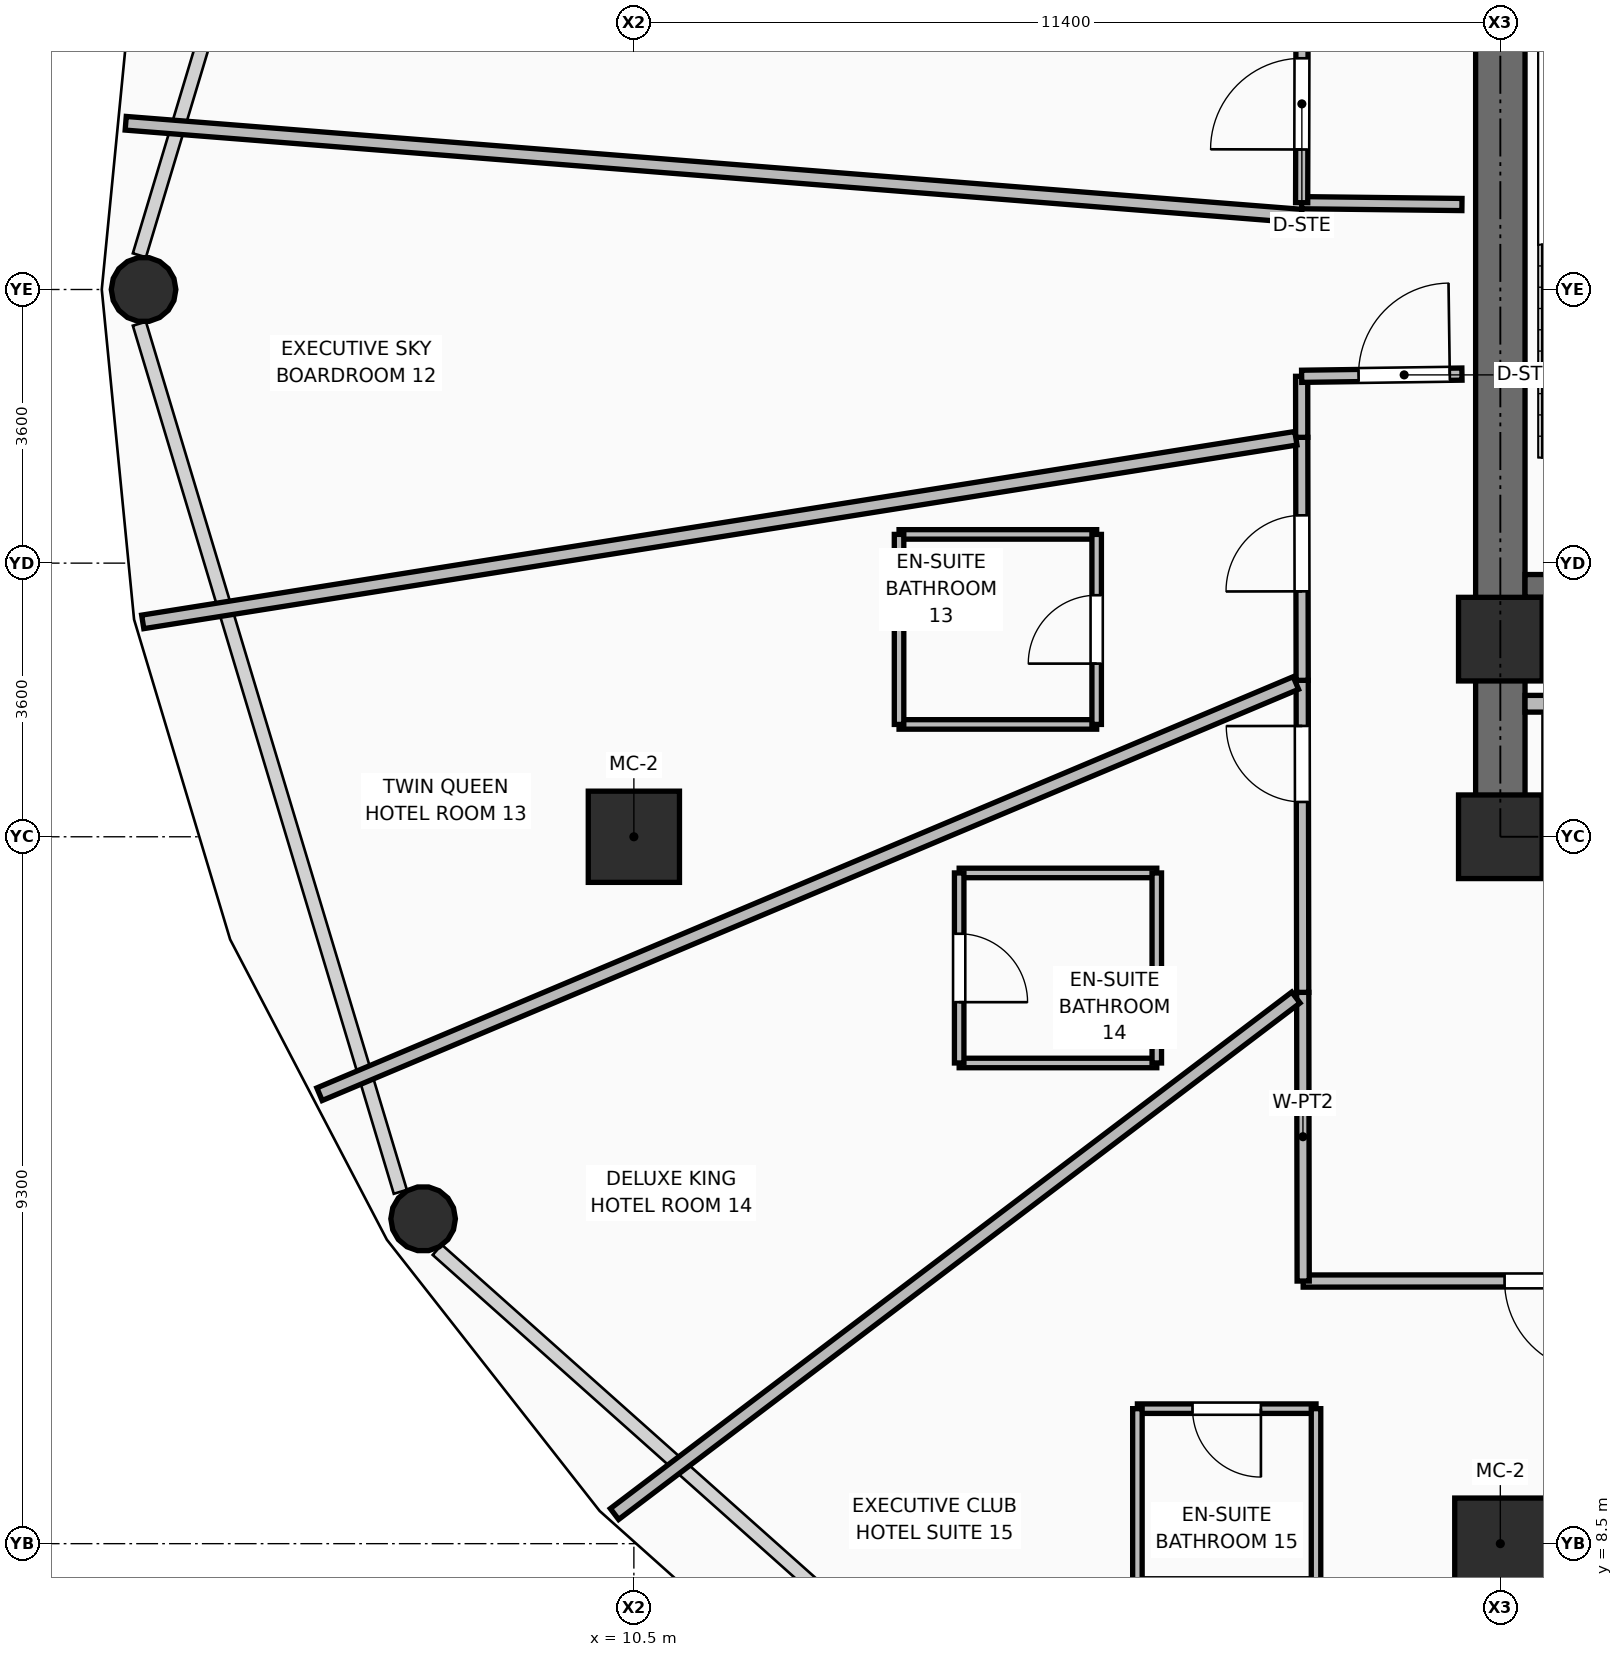
"""IFC4 building model, lengths in metres.
Left out: names, types, materials, properties, quantities, classifications, styles, units other than length and angle.
Written with IfcOpenShell. Run it as: python <this file> out.ifc"""

import sys

from ifc_helpers import new_model, si_unit, direction, frame, frame_2d, origin, origin_2d, place, context, subcontext, project, spatial, rectangle, hollow_rectangle, hollow_circle, extrude, element, fill, save


model = new_model("IFC4")
c1 = context("Model", 3, precision=1e-05, world=origin(), true_north=direction((0.0, 1.0)))
c2 = subcontext(c1, "Body", "Model", "MODEL_VIEW")
j1 = project(units=[si_unit("LENGTHUNIT", "METRE"), si_unit("PLANEANGLEUNIT", "RADIAN")], contexts=[c1])
p1 = place(None, origin())
s1 = spatial("IfcSite", under=j1, at=p1, CompositionType="ELEMENT")
p2 = place(p1, origin())
s2 = spatial("IfcBuilding", under=s1, at=p2, CompositionType="ELEMENT")
p3 = place(p2, frame((0.0, 0.0, 64.5)))
s3 = spatial("IfcBuildingStorey", under=s2, at=p3, CompositionType="ELEMENT", Elevation=64.5)
for number, where, z_axis, x_axis in (
    (1, (21.9, 17.8, 0.0), (0.0, 0.0, 1.0), (1.0, 0.0, 0.0)),
    (2, (21.9, 20.4, 0.0), (0.0, 0.0, 1.0), (1.0, 0.0, 0.0)),
):
    element("IfcColumn", number, at=place(p3, frame(where, z_axis=z_axis, x_axis=x_axis)), inside=s3, PredefinedType="COLUMN", context=c2, shape_type="SweptSolid", body=[
        extrude(rectangle(XDim=1.1, YDim=1.1, at=origin_2d()), origin(), (0.0, 0.0, 1.0), 3.75),
    ])
for number, where, z_axis, x_axis in (
    (3, (21.9, 8.5, 0.0), (0.0, 0.0, 1.0), (1.0, 0.0, 0.0)),
    (4, (10.5, 17.8, 0.0), (0.0, 0.0, 1.0), (1.0, 0.0, 0.0)),
):
    element("IfcColumn", number, at=place(p3, frame(where, z_axis=z_axis, x_axis=x_axis)), inside=s3, PredefinedType="COLUMN", context=c2, shape_type="SweptSolid", body=[
        extrude(hollow_rectangle(XDim=1.2, YDim=1.2, WallThickness=0.045, at=origin_2d()), origin(), (0.0, 0.0, 1.0), 3.75),
    ])
p4 = place(p3, frame((4.049, 25.0, 0.0), z_axis=(-0.055647755416, 0.0, 0.998450463126), x_axis=(0.0, -1.0, 0.0)))
e5 = element("IfcColumn", 5, at=p4, inside=s3, PredefinedType="COLUMN", context=c2, shape_type="SweptSolid", body=[
    extrude(hollow_circle(Radius=0.425, WallThickness=0.04, at=origin_2d()), origin(), (0.0, 0.0, 1.0), 3.576),
])
p5 = place(p3, frame((7.727, 12.774, 0.0), z_axis=(-0.048413411524, -0.024855404506, 0.998518077178), x_axis=(0.456724176891, -0.889608355538, 0.0)))
e6 = element("IfcColumn", 6, at=p5, inside=s3, PredefinedType="COLUMN", context=c2, shape_type="SweptSolid", body=[
    extrude(hollow_circle(Radius=0.425, WallThickness=0.04, at=origin_2d()), origin(), (0.0, 0.0, 1.0), 3.575),
])
p6 = place(p3, frame((21.575, 17.8, 0.0), z_axis=(0.0, 0.0, 1.0), x_axis=(1.0, 0.0, 0.0)))
e7 = element("IfcWall", 7, at=p6, inside=s3, PredefinedType="SHEAR", context=c2, shape_type="SweptSolid", body=[
    extrude(rectangle(XDim=2.175, YDim=0.65, at=frame_2d((1.087, 0.0))), origin(), (0.0, 0.0, 1.0), 3.57),
])
p7 = place(p3, frame((21.9, 18.125, 0.0), z_axis=(0.0, 0.0, 1.0), x_axis=(0.0, 1.0, 0.0)))
e8 = element("IfcWall", 8, at=p7, inside=s3, PredefinedType="SHEAR", context=c2, shape_type="SweptSolid", body=[
    extrude(rectangle(XDim=14.0, YDim=0.65, at=frame_2d((7.0, 0.0))), origin(), (0.0, 0.0, 1.0), 3.57),
])
p8 = place(p3, frame((22.225, 21.1, 0.0), z_axis=(0.0, 0.0, 1.0), x_axis=(1.0, 0.0, 0.0)))
e9 = element("IfcWall", 9, at=p8, inside=s3, PredefinedType="SHEAR", context=c2, shape_type="SweptSolid", body=[
    extrude(rectangle(XDim=3.515, YDim=0.3, at=frame_2d((1.757, 0.0))), origin(), (0.0, 0.0, 1.0), 3.57),
])
p9 = place(p8, frame((1.995, 0.0, 0.0)))
e10 = element("IfcOpeningElement", 10, at=p9, cuts=e9, PredefinedType="OPENING", context=c2, shape_type="SweptSolid", body=[
    extrude(rectangle(XDim=1.05, YDim=2.1, at=frame_2d((0.525, 1.05))), frame((0.0, 0.16, 0.0), z_axis=(0.0, -1.0, 0.0), x_axis=(1.0, 0.0, 0.0)), (0.0, 0.0, 1.0), 0.32),
])
p10 = place(p3, frame((22.225, 19.55, 0.0), z_axis=(0.0, 0.0, 1.0), x_axis=(1.0, 0.0, 0.0)))
e11 = element("IfcWall", 11, at=p10, inside=s3, PredefinedType="PARTITIONING", context=c2, shape_type="SweptSolid", body=[
    extrude(rectangle(XDim=1.565, YDim=0.22, at=frame_2d((0.782, 0.0))), origin(), (0.0, 0.0, 1.0), 2.595),
])
p11 = place(p3, frame((21.395, 26.118, 0.0), z_axis=(0.0, 0.0, 1.0), x_axis=(-0.999934344566, 0.011458907294, 0.0)))
e12 = element("IfcWall", 12, at=p11, inside=s3, PredefinedType="PARTITIONING", context=c2, shape_type="SweptSolid", body=[
    extrude(rectangle(XDim=2.109, YDim=0.16, at=frame_2d((1.055, 0.0))), origin(), (0.0, 0.0, 1.0), 3.55),
])
p12 = place(p3, frame((19.286, 26.142, 0.0), z_axis=(0.0, 0.0, 1.0), x_axis=(0.00212602632, 0.999997740003, 0.0)))
e13 = element("IfcWall", 13, at=p12, inside=s3, PredefinedType="PARTITIONING", context=c2, shape_type="SweptSolid", body=[
    extrude(rectangle(XDim=2.871, YDim=0.16, at=frame_2d((1.436, 0.0))), origin(), (0.0, 0.0, 1.0), 3.55),
])
p13 = place(p12, frame((0.7, 0.0, 0.0)))
e14 = element("IfcOpeningElement", 14, at=p13, cuts=e13, PredefinedType="OPENING", context=c2, shape_type="SweptSolid", body=[
    extrude(rectangle(XDim=1.2, YDim=2.1, at=frame_2d((0.6, 1.05))), frame((0.0, 0.09, 0.0), z_axis=(0.0, -1.0, 0.0), x_axis=(1.0, 0.0, 0.0)), (0.0, 0.0, 1.0), 0.18),
])
p14 = place(p3, frame((26.245, 11.959, 0.0), z_axis=(0.0, 0.0, 1.0), x_axis=(-0.999999841558, -0.000562924303, 0.0)))
e15 = element("IfcWall", 15, at=p14, inside=s3, PredefinedType="PARTITIONING", context=c2, shape_type="SweptSolid", body=[
    extrude(rectangle(XDim=6.939, YDim=0.16, at=frame_2d((3.47, 0.0))), origin(), (0.0, 0.0, 1.0), 2.928),
])
p15 = place(p14, frame((3.089, 0.0, 0.0)))
e16 = element("IfcOpeningElement", 16, at=p15, cuts=e15, PredefinedType="OPENING", context=c2, shape_type="SweptSolid", body=[
    extrude(rectangle(XDim=1.2, YDim=2.1, at=frame_2d((0.6, 1.05))), frame((0.0, 0.09, 0.0), z_axis=(0.0, -1.0, 0.0), x_axis=(1.0, 0.0, 0.0)), (0.0, 0.0, 1.0), 0.18),
])
p16 = place(p3, frame((19.306, 11.955, 0.0), z_axis=(0.0, 0.0, 1.0), x_axis=(-0.001542811226, 0.999998809866, 0.0)))
e17 = element("IfcWall", 17, at=p16, inside=s3, PredefinedType="PARTITIONING", context=c2, shape_type="SweptSolid", body=[
    extrude(rectangle(XDim=3.798, YDim=0.16, at=frame_2d((1.899, 0.0))), origin(), (0.0, 0.0, 1.0), 3.55),
])
p17 = place(p3, frame((19.3, 15.753, 0.0), z_axis=(0.0, 0.0, 1.0), x_axis=(-0.001724750617, 0.999998512617, 0.0)))
e18 = element("IfcWall", 18, at=p17, inside=s3, PredefinedType="PARTITIONING", context=c2, shape_type="SweptSolid", body=[
    extrude(rectangle(XDim=4.105, YDim=0.16, at=frame_2d((2.052, 0.0))), origin(), (0.0, 0.0, 1.0), 2.928),
])
p18 = place(p17, frame((2.505, 0.0, 0.0)))
e19 = element("IfcOpeningElement", 19, at=p18, cuts=e18, PredefinedType="OPENING", context=c2, shape_type="SweptSolid", body=[
    extrude(rectangle(XDim=1.0, YDim=2.1, at=frame_2d((0.5, 1.05))), frame((0.0, 0.09, 0.0), z_axis=(0.0, -1.0, 0.0), x_axis=(1.0, 0.0, 0.0)), (0.0, 0.0, 1.0), 0.18),
])
p19 = place(p3, frame((19.293, 19.858, 0.0), z_axis=(0.0, 0.0, 1.0), x_axis=(-0.001832757518, 0.999998320499, 0.0)))
e20 = element("IfcWall", 20, at=p19, inside=s3, PredefinedType="PARTITIONING", context=c2, shape_type="SweptSolid", body=[
    extrude(rectangle(XDim=3.197, YDim=0.16, at=frame_2d((1.599, 0.0))), origin(), (0.0, 0.0, 1.0), 2.928),
])
p20 = place(p19, frame((1.171, 0.0, 0.0)))
e21 = element("IfcOpeningElement", 21, at=p20, cuts=e20, PredefinedType="OPENING", context=c2, shape_type="SweptSolid", body=[
    extrude(rectangle(XDim=1.0, YDim=2.1, at=frame_2d((0.5, 1.05))), frame((0.0, 0.09, 0.0), z_axis=(0.0, -1.0, 0.0), x_axis=(1.0, 0.0, 0.0)), (0.0, 0.0, 1.0), 0.18),
])
p21 = place(p3, frame((19.287, 23.055, 0.0), z_axis=(0.0, 0.0, 1.0), x_axis=(-0.001520217155, 0.999998844469, 0.0)))
e22 = element("IfcWall", 22, at=p21, inside=s3, PredefinedType="PARTITIONING", context=c2, shape_type="SweptSolid", body=[
    extrude(rectangle(XDim=0.803, YDim=0.16, at=frame_2d((0.401, 0.0))), origin(), (0.0, 0.0, 1.0), 3.55),
])
p22 = place(p3, frame((19.286, 23.858, 0.0), z_axis=(0.0, 0.0, 1.0), x_axis=(0.999905141734, 0.013773435799, 0.0)))
e23 = element("IfcWall", 23, at=p22, inside=s3, PredefinedType="PARTITIONING", context=c2, shape_type="SweptSolid", body=[
    extrude(rectangle(XDim=2.109, YDim=0.16, at=frame_2d((1.055, 0.0))), origin(), (0.0, 0.0, 1.0), 3.55),
])
p23 = place(p22, frame((0.749, 0.0, 0.0)))
e24 = element("IfcOpeningElement", 24, at=p23, cuts=e23, PredefinedType="OPENING", context=c2, shape_type="SweptSolid", body=[
    extrude(rectangle(XDim=1.2, YDim=2.1, at=frame_2d((0.6, 1.05))), frame((0.0, 0.09, 0.0), z_axis=(0.0, -1.0, 0.0), x_axis=(1.0, 0.0, 0.0)), (0.0, 0.0, 1.0), 0.18),
])
p24 = place(p3, frame((19.284, 25.965, 0.0), z_axis=(0.0, 0.0, 1.0), x_axis=(-0.996895062006, 0.078741573192, 0.0)))
e25 = element("IfcWall", 25, at=p24, inside=s3, PredefinedType="PARTITIONING", context=c2, shape_type="SweptSolid", body=[
    extrude(rectangle(XDim=15.518, YDim=0.18, at=frame_2d((7.759, 0.0))), origin(), (0.0, 0.0, 1.0), 2.775),
])
p25 = place(p3, frame((19.21, 23.043, 0.0), z_axis=(0.0, 0.0, 1.0), x_axis=(-0.987556982697, -0.157261584397, 0.0)))
e26 = element("IfcWall", 26, at=p25, inside=s3, PredefinedType="PARTITIONING", context=c2, shape_type="SweptSolid", body=[
    extrude(rectangle(XDim=15.363, YDim=0.18, at=frame_2d((7.682, 0.0))), origin(), (0.0, 0.0, 1.0), 2.775),
])
p26 = place(p3, frame((19.21, 19.823, 0.0), z_axis=(0.0, 0.0, 1.0), x_axis=(-0.921607348109, -0.388123557533, 0.0)))
e27 = element("IfcWall", 27, at=p26, inside=s3, PredefinedType="PARTITIONING", context=c2, shape_type="SweptSolid", body=[
    extrude(rectangle(XDim=13.939, YDim=0.18, at=frame_2d((6.969, 0.0))), origin(), (0.0, 0.0, 1.0), 2.775),
])
p27 = place(p3, frame((19.21, 15.685, 0.0), z_axis=(0.0, 0.0, 1.0), x_axis=(-0.796937326032, -0.604061998786, 0.0)))
e28 = element("IfcWall", 28, at=p27, inside=s3, PredefinedType="PARTITIONING", context=c2, shape_type="SweptSolid", body=[
    extrude(rectangle(XDim=11.249, YDim=0.18, at=frame_2d((5.625, 0.0))), origin(), (0.0, 0.0, 1.0), 2.775),
])
p28 = place(p3, frame((26.211, 11.875, 0.0), z_axis=(0.0, 0.0, 1.0), x_axis=(-0.373770341631, -0.9275212837, 0.0)))
e29 = element("IfcWall", 29, at=p28, inside=s3, PredefinedType="PARTITIONING", context=c2, shape_type="SweptSolid", body=[
    extrude(rectangle(XDim=11.103, YDim=0.18, at=frame_2d((5.551, 0.0))), origin(), (0.0, 0.0, 1.0), 2.775),
])
p29 = place(p3, frame((13.989, 19.278, 0.0), z_axis=(0.0, 0.0, 1.0), x_axis=(1.0, 0.0, 0.0)))
e30 = element("IfcWall", 30, at=p29, inside=s3, PredefinedType="PARTITIONING", context=c2, shape_type="SweptSolid", body=[
    extrude(rectangle(XDim=2.6, YDim=0.125, at=frame_2d((1.3, 0.0))), origin(), (0.0, 0.0, 1.0), 3.55),
])
p30 = place(p3, frame((13.989, 21.778, 0.0), z_axis=(0.0, 0.0, 1.0), x_axis=(1.0, 0.0, 0.0)))
e31 = element("IfcWall", 31, at=p30, inside=s3, PredefinedType="PARTITIONING", context=c2, shape_type="SweptSolid", body=[
    extrude(rectangle(XDim=2.6, YDim=0.125, at=frame_2d((1.3, 0.0))), origin(), (0.0, 0.0, 1.0), 2.928),
])
p31 = place(p3, frame((13.989, 19.278, 0.0), z_axis=(0.0, 0.0, 1.0), x_axis=(0.0, 1.0, 0.0)))
e32 = element("IfcWall", 32, at=p31, inside=s3, PredefinedType="PARTITIONING", context=c2, shape_type="SweptSolid", body=[
    extrude(rectangle(XDim=2.5, YDim=0.125, at=frame_2d((1.25, 0.0))), origin(), (0.0, 0.0, 1.0), 3.55),
])
p32 = place(p3, frame((16.589, 19.278, 0.0), z_axis=(0.0, 0.0, 1.0), x_axis=(0.0, 1.0, 0.0)))
e33 = element("IfcWall", 33, at=p32, inside=s3, PredefinedType="PARTITIONING", context=c2, shape_type="SweptSolid", body=[
    extrude(rectangle(XDim=2.5, YDim=0.125, at=frame_2d((1.25, 0.0))), origin(), (0.0, 0.0, 1.0), 2.928),
])
p33 = place(p32, frame((0.8, 0.0, 0.0)))
e34 = element("IfcOpeningElement", 34, at=p33, cuts=e33, PredefinedType="OPENING", context=c2, shape_type="SweptSolid", body=[
    extrude(rectangle(XDim=0.9, YDim=2.1, at=frame_2d((0.45, 1.05))), frame((0.0, 0.073, 0.0), z_axis=(0.0, -1.0, 0.0), x_axis=(1.0, 0.0, 0.0)), (0.0, 0.0, 1.0), 0.145),
])
for number, where, z_axis, x_axis in (
    (35, (14.78, 14.824, 0.0), (0.0, 0.0, 1.0), (1.0, 0.0, 0.0)),
    (36, (14.78, 17.324, 0.0), (0.0, 0.0, 1.0), (1.0, 0.0, 0.0)),
):
    element("IfcWall", number, at=place(p3, frame(where, z_axis=z_axis, x_axis=x_axis)), inside=s3, PredefinedType="PARTITIONING", context=c2, shape_type="SweptSolid", body=[
        extrude(rectangle(XDim=2.6, YDim=0.125, at=frame_2d((1.3, 0.0))), origin(), (0.0, 0.0, 1.0), 3.55),
    ])
p34 = place(p3, frame((14.78, 14.824, 0.0), z_axis=(0.0, 0.0, 1.0), x_axis=(0.0, 1.0, 0.0)))
e37 = element("IfcWall", 37, at=p34, inside=s3, PredefinedType="PARTITIONING", context=c2, shape_type="SweptSolid", body=[
    extrude(rectangle(XDim=2.5, YDim=0.125, at=frame_2d((1.25, 0.0))), origin(), (0.0, 0.0, 1.0), 2.928),
])
p35 = place(p34, frame((0.8, 0.0, 0.0)))
e38 = element("IfcOpeningElement", 38, at=p35, cuts=e37, PredefinedType="OPENING", context=c2, shape_type="SweptSolid", body=[
    extrude(rectangle(XDim=0.9, YDim=2.1, at=frame_2d((0.45, 1.05))), frame((0.0, 0.073, 0.0), z_axis=(0.0, -1.0, 0.0), x_axis=(1.0, 0.0, 0.0)), (0.0, 0.0, 1.0), 0.145),
])
p36 = place(p3, frame((17.38, 14.824, 0.0), z_axis=(0.0, 0.0, 1.0), x_axis=(0.0, 1.0, 0.0)))
e39 = element("IfcWall", 39, at=p36, inside=s3, PredefinedType="PARTITIONING", context=c2, shape_type="SweptSolid", body=[
    extrude(rectangle(XDim=2.5, YDim=0.125, at=frame_2d((1.25, 0.0))), origin(), (0.0, 0.0, 1.0), 2.928),
])
p37 = place(p3, frame((17.125, 10.276, 0.0), z_axis=(0.0, 0.0, 1.0), x_axis=(1.0, 0.0, 0.0)))
e40 = element("IfcWall", 40, at=p37, inside=s3, PredefinedType="PARTITIONING", context=c2, shape_type="SweptSolid", body=[
    extrude(rectangle(XDim=2.35, YDim=0.125, at=frame_2d((1.175, 0.0))), origin(), (0.0, 0.0, 1.0), 2.928),
])
p38 = place(p37, frame((0.725, 0.0, 0.0)))
e41 = element("IfcOpeningElement", 41, at=p38, cuts=e40, PredefinedType="OPENING", context=c2, shape_type="SweptSolid", body=[
    extrude(rectangle(XDim=0.9, YDim=2.1, at=frame_2d((0.45, 1.05))), frame((0.0, 0.073, 0.0), z_axis=(0.0, -1.0, 0.0), x_axis=(1.0, 0.0, 0.0)), (0.0, 0.0, 1.0), 0.145),
])
p39 = place(p3, frame((17.125, 7.976, 0.0), z_axis=(0.0, 0.0, 1.0), x_axis=(0.0, 1.0, 0.0)))
e42 = element("IfcWall", 42, at=p39, inside=s3, PredefinedType="PARTITIONING", context=c2, shape_type="SweptSolid", body=[
    extrude(rectangle(XDim=2.3, YDim=0.125, at=frame_2d((1.15, 0.0))), origin(), (0.0, 0.0, 1.0), 3.55),
])
p40 = place(p3, frame((19.475, 7.976, 0.0), z_axis=(0.0, 0.0, 1.0), x_axis=(0.0, 1.0, 0.0)))
e43 = element("IfcWall", 43, at=p40, inside=s3, PredefinedType="PARTITIONING", context=c2, shape_type="SweptSolid", body=[
    extrude(rectangle(XDim=2.3, YDim=0.125, at=frame_2d((1.15, 0.0))), origin(), (0.0, 0.0, 1.0), 2.928),
])
p41 = place(p13, origin())
e44 = element("IfcDoor", 44, at=p41, inside=s3, OperationType="SINGLE_SWING_LEFT", PredefinedType="DOOR", context=c2, shape_type="SweptSolid", body=[
    extrude(rectangle(XDim=1.2, YDim=2.1, at=frame_2d((0.6, 1.05))), frame((0.0, 0.025, 0.0), z_axis=(0.0, -1.0, 0.0), x_axis=(1.0, 0.0, 0.0)), (0.0, 0.0, 1.0), 0.05),
])
fill(e14, e44)
p42 = place(p23, origin())
e45 = element("IfcDoor", 45, at=p42, inside=s3, OperationType="SINGLE_SWING_RIGHT", PredefinedType="DOOR", context=c2, shape_type="SweptSolid", body=[
    extrude(rectangle(XDim=1.2, YDim=2.1, at=frame_2d((0.6, 1.05))), frame((0.0, 0.025, 0.0), z_axis=(0.0, -1.0, 0.0), x_axis=(1.0, 0.0, 0.0)), (0.0, 0.0, 1.0), 0.05),
])
fill(e24, e45)
p43 = place(p33, origin())
e46 = element("IfcDoor", 46, at=p43, inside=s3, OperationType="SINGLE_SWING_LEFT", PredefinedType="DOOR", context=c2, shape_type="SweptSolid", body=[
    extrude(rectangle(XDim=0.9, YDim=2.1, at=frame_2d((0.45, 1.05))), frame((0.0, 0.025, 0.0), z_axis=(0.0, -1.0, 0.0), x_axis=(1.0, 0.0, 0.0)), (0.0, 0.0, 1.0), 0.05),
])
fill(e34, e46)
p44 = place(p20, origin())
e47 = element("IfcDoor", 47, at=p44, inside=s3, OperationType="SINGLE_SWING_LEFT", PredefinedType="DOOR", context=c2, shape_type="SweptSolid", body=[
    extrude(rectangle(XDim=1.0, YDim=2.1, at=frame_2d((0.5, 1.05))), frame((0.0, 0.025, 0.0), z_axis=(0.0, -1.0, 0.0), x_axis=(1.0, 0.0, 0.0)), (0.0, 0.0, 1.0), 0.05),
])
fill(e21, e47)
p45 = place(p35, frame((0.9, 0.0, 0.0), z_axis=(0.0, 0.0, 1.0), x_axis=(-1.0, 0.0, 0.0)))
e48 = element("IfcDoor", 48, at=p45, inside=s3, OperationType="SINGLE_SWING_RIGHT", PredefinedType="DOOR", context=c2, shape_type="SweptSolid", body=[
    extrude(rectangle(XDim=0.9, YDim=2.1, at=frame_2d((0.45, 1.05))), frame((0.0, 0.025, 0.0), z_axis=(0.0, -1.0, 0.0), x_axis=(1.0, 0.0, 0.0)), (0.0, 0.0, 1.0), 0.05),
])
fill(e38, e48)
p46 = place(p18, origin())
e49 = element("IfcDoor", 49, at=p46, inside=s3, OperationType="SINGLE_SWING_RIGHT", PredefinedType="DOOR", context=c2, shape_type="SweptSolid", body=[
    extrude(rectangle(XDim=1.0, YDim=2.1, at=frame_2d((0.5, 1.05))), frame((0.0, 0.025, 0.0), z_axis=(0.0, -1.0, 0.0), x_axis=(1.0, 0.0, 0.0)), (0.0, 0.0, 1.0), 0.05),
])
fill(e19, e49)
p47 = place(p38, frame((0.9, 0.0, 0.0), z_axis=(0.0, 0.0, 1.0), x_axis=(-1.0, 0.0, 0.0)))
e50 = element("IfcDoor", 50, at=p47, inside=s3, OperationType="SINGLE_SWING_LEFT", PredefinedType="DOOR", context=c2, shape_type="SweptSolid", body=[
    extrude(rectangle(XDim=0.9, YDim=2.1, at=frame_2d((0.45, 1.05))), frame((0.0, 0.025, 0.0), z_axis=(0.0, -1.0, 0.0), x_axis=(1.0, 0.0, 0.0)), (0.0, 0.0, 1.0), 0.05),
])
fill(e41, e50)
p48 = place(p15, origin())
e51 = element("IfcDoor", 51, at=p48, inside=s3, OperationType="SINGLE_SWING_LEFT", PredefinedType="DOOR", context=c2, shape_type="SweptSolid", body=[
    extrude(rectangle(XDim=1.2, YDim=2.1, at=frame_2d((0.6, 1.05))), frame((0.0, 0.025, 0.0), z_axis=(0.0, -1.0, 0.0), x_axis=(1.0, 0.0, 0.0)), (0.0, 0.0, 1.0), 0.05),
])
fill(e16, e51)
save(model, sys.argv[1])
